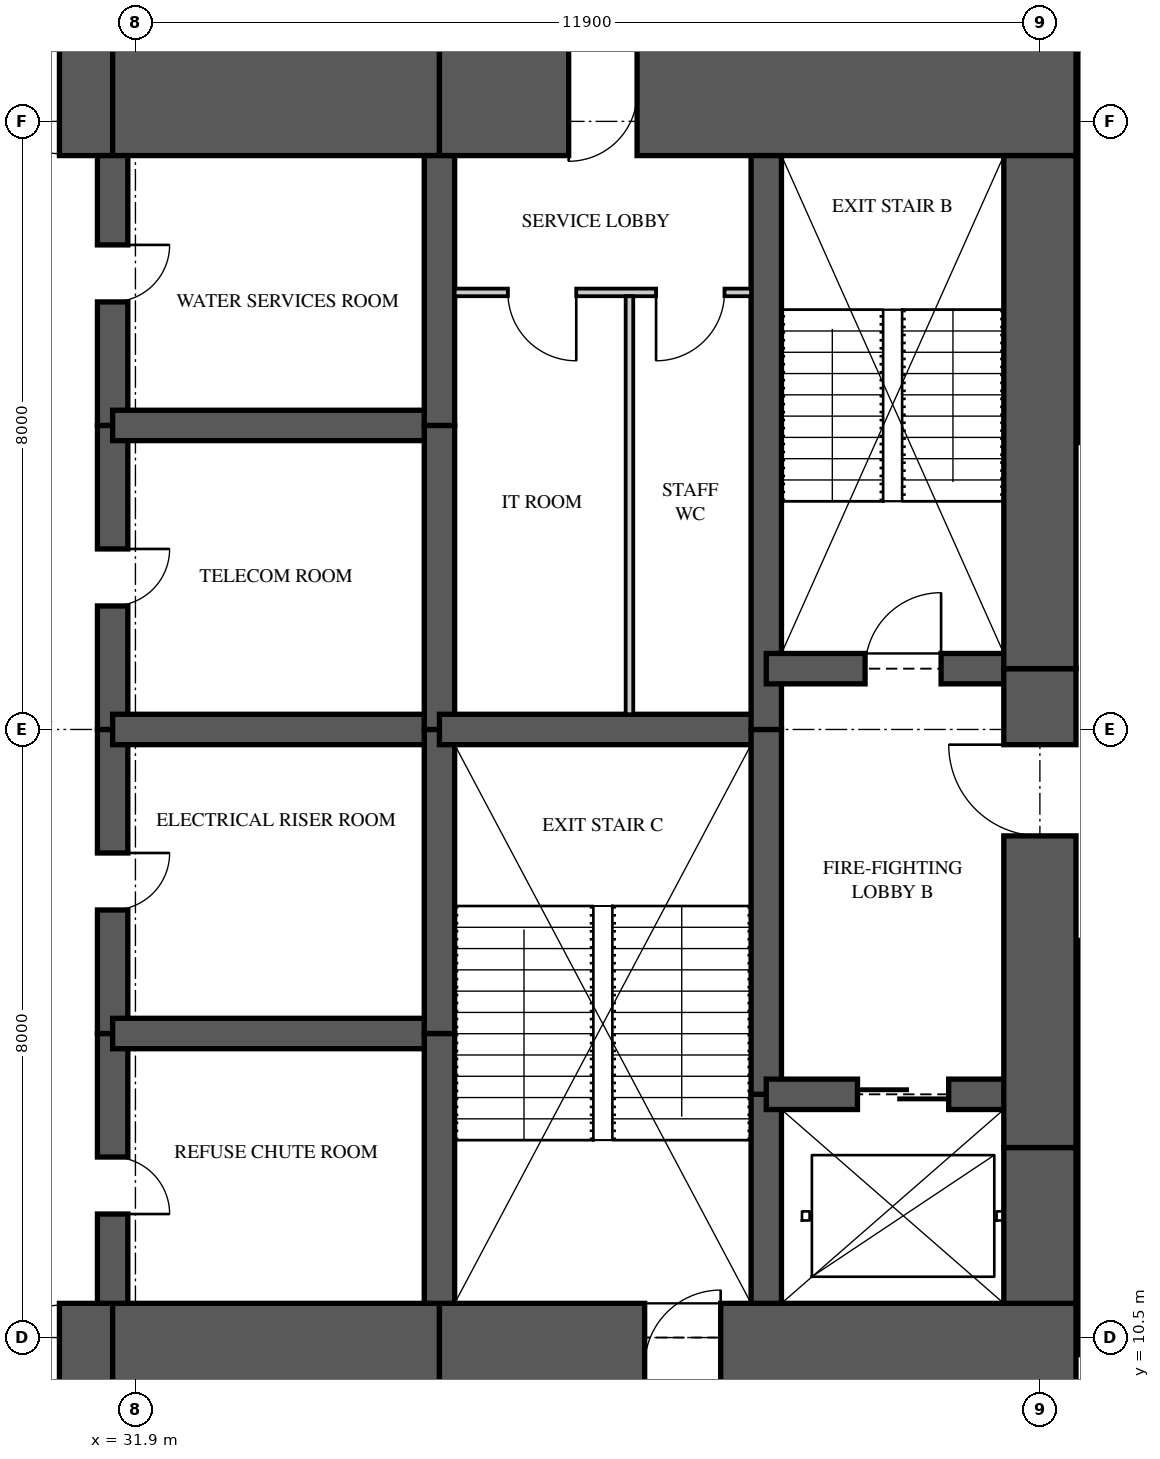
"""IFC4 building model, lengths in metres.
Left out: names, types, materials, properties, quantities, classifications, styles, units other than length and angle.
Written with IfcOpenShell. Run it as: python <this file> out.ifc"""

import sys

from ifc_helpers import new_model, si_unit, direction, frame, frame_2d, origin, place, context, subcontext, project, spatial, rectangle, extrude, element, fill, save


model = new_model("IFC4")
c1 = context("Model", 3, precision=1e-05, world=origin(), true_north=direction((0.0, 1.0)))
c2 = subcontext(c1, "Body", "Model", "MODEL_VIEW")
j1 = project(units=[si_unit("LENGTHUNIT", "METRE"), si_unit("PLANEANGLEUNIT", "RADIAN")], contexts=[c1])
p1 = place(None, origin())
s1 = spatial("IfcSite", under=j1, at=p1, CompositionType="ELEMENT")
p2 = place(p1, origin())
s2 = spatial("IfcBuilding", under=s1, at=p2, CompositionType="ELEMENT")
p3 = place(p2, frame((0.0, 0.0, 37.75)))
s3 = spatial("IfcBuildingStorey", under=s2, at=p3, CompositionType="ELEMENT", Elevation=37.75)
p4 = place(p3, frame((26.0, 10.125, 0.0), z_axis=(0.0, 0.0, 1.0), x_axis=(1.0, 0.0, 0.0)))
e1 = element("IfcWall", 1, at=p4, inside=s3, PredefinedType="SHEAR", context=c2, shape_type="SweptSolid", body=[
    extrude(rectangle(XDim=5.6, YDim=1.65, at=frame_2d((2.8, 0.0))), origin(), (0.0, 0.0, 1.0), 3.35),
])
p5 = place(p4, frame((3.3, 0.0, 0.0)))
e2 = element("IfcOpeningElement", 2, at=p5, cuts=e1, PredefinedType="OPENING", context=c2, shape_type="SweptSolid", body=[
    extrude(rectangle(XDim=1.6, YDim=2.1, at=frame_2d((0.8, 1.05))), frame((0.0, 0.835, 0.0), z_axis=(0.0, -1.0, 0.0), x_axis=(1.0, 0.0, 0.0)), (0.0, 0.0, 1.0), 1.67),
])
p6 = place(p3, frame((31.6, 10.125, 0.0), z_axis=(0.0, 0.0, 1.0), x_axis=(1.0, 0.0, 0.0)))
e3 = element("IfcWall", 3, at=p6, inside=s3, PredefinedType="SHEAR", context=c2, shape_type="SweptSolid", body=[
    extrude(rectangle(XDim=4.3, YDim=1.65, at=frame_2d((2.15, 0.0))), origin(), (0.0, 0.0, 1.0), 3.35),
])
p7 = place(p3, frame((35.9, 10.125, 0.0), z_axis=(0.0, 0.0, 1.0), x_axis=(1.0, 0.0, 0.0)))
e4 = element("IfcWall", 4, at=p7, inside=s3, PredefinedType="SHEAR", context=c2, shape_type="SweptSolid", body=[
    extrude(rectangle(XDim=8.375, YDim=1.65, at=frame_2d((4.188, 0.0))), origin(), (0.0, 0.0, 1.0), 3.35),
])
p8 = place(p7, frame((2.7, 0.0, 0.0)))
e5 = element("IfcOpeningElement", 5, at=p8, cuts=e4, PredefinedType="OPENING", context=c2, shape_type="SweptSolid", body=[
    extrude(rectangle(XDim=1.0, YDim=2.1, at=frame_2d((0.5, 1.05))), frame((0.0, 0.835, 0.0), z_axis=(0.0, -1.0, 0.0), x_axis=(1.0, 0.0, 0.0)), (0.0, 0.0, 1.0), 1.67),
])
p9 = place(p3, frame((44.275, 26.875, 0.0), z_axis=(0.0, 0.0, 1.0), x_axis=(-1.0, 0.0, 0.0)))
e6 = element("IfcWall", 6, at=p9, inside=s3, PredefinedType="SHEAR", context=c2, shape_type="SweptSolid", body=[
    extrude(rectangle(XDim=8.375, YDim=1.65, at=frame_2d((4.188, 0.0))), origin(), (0.0, 0.0, 1.0), 3.35),
])
p10 = place(p9, frame((5.775, 0.0, 0.0)))
e7 = element("IfcOpeningElement", 7, at=p10, cuts=e6, PredefinedType="OPENING", context=c2, shape_type="SweptSolid", body=[
    extrude(rectangle(XDim=0.9, YDim=2.1, at=frame_2d((0.45, 1.05))), frame((0.0, 0.835, 0.0), z_axis=(0.0, -1.0, 0.0), x_axis=(1.0, 0.0, 0.0)), (0.0, 0.0, 1.0), 1.67),
])
p11 = place(p3, frame((35.9, 26.875, 0.0), z_axis=(0.0, 0.0, 1.0), x_axis=(-1.0, 0.0, 0.0)))
e8 = element("IfcWall", 8, at=p11, inside=s3, PredefinedType="SHEAR", context=c2, shape_type="SweptSolid", body=[
    extrude(rectangle(XDim=4.3, YDim=1.65, at=frame_2d((2.15, 0.0))), origin(), (0.0, 0.0, 1.0), 3.35),
])
p12 = place(p3, frame((31.6, 26.875, 0.0), z_axis=(0.0, 0.0, 1.0), x_axis=(-1.0, 0.0, 0.0)))
e9 = element("IfcWall", 9, at=p12, inside=s3, PredefinedType="SHEAR", context=c2, shape_type="SweptSolid", body=[
    extrude(rectangle(XDim=5.6, YDim=1.65, at=frame_2d((2.8, 0.0))), origin(), (0.0, 0.0, 1.0), 3.35),
])
p13 = place(p12, frame((0.7, 0.0, 0.0)))
e10 = element("IfcOpeningElement", 10, at=p13, cuts=e9, PredefinedType="OPENING", context=c2, shape_type="SweptSolid", body=[
    extrude(rectangle(XDim=1.6, YDim=2.1, at=frame_2d((0.8, 1.05))), frame((0.0, 0.835, 0.0), z_axis=(0.0, -1.0, 0.0), x_axis=(1.0, 0.0, 0.0)), (0.0, 0.0, 1.0), 1.67),
])
p14 = place(p3, frame((43.8, 10.95, 0.0), z_axis=(0.0, 0.0, 1.0), x_axis=(0.0, 1.0, 0.0)))
e11 = element("IfcWall", 11, at=p14, inside=s3, PredefinedType="SHEAR", context=c2, shape_type="SweptSolid", body=[
    extrude(rectangle(XDim=2.05, YDim=0.95, at=frame_2d((1.025, 0.0))), origin(), (0.0, 0.0, 1.0), 3.35),
])
p15 = place(p3, frame((43.8, 13.0, 0.0), z_axis=(0.0, 0.0, 1.0), x_axis=(0.0, 1.0, 0.0)))
e12 = element("IfcWall", 12, at=p15, inside=s3, PredefinedType="SHEAR", context=c2, shape_type="SweptSolid", body=[
    extrude(rectangle(XDim=6.3, YDim=0.95, at=frame_2d((3.15, 0.0))), origin(), (0.0, 0.0, 1.0), 3.35),
])
p16 = place(p15, frame((4.1, 0.0, 0.0)))
e13 = element("IfcOpeningElement", 13, at=p16, cuts=e12, PredefinedType="OPENING", context=c2, shape_type="SweptSolid", body=[
    extrude(rectangle(XDim=1.2, YDim=2.2, at=frame_2d((0.6, 1.1))), frame((0.0, 0.485, 0.0), z_axis=(0.0, -1.0, 0.0), x_axis=(1.0, 0.0, 0.0)), (0.0, 0.0, 1.0), 0.97),
])
p17 = place(p3, frame((43.8, 19.3, 0.0), z_axis=(0.0, 0.0, 1.0), x_axis=(0.0, 1.0, 0.0)))
e14 = element("IfcWall", 14, at=p17, inside=s3, PredefinedType="SHEAR", context=c2, shape_type="SweptSolid", body=[
    extrude(rectangle(XDim=6.75, YDim=0.95, at=frame_2d((3.375, 0.0))), origin(), (0.0, 0.0, 1.0), 3.35),
])
p18 = place(p3, frame((31.6, 10.95, 0.0), z_axis=(0.0, 0.0, 1.0), x_axis=(0.0, 1.0, 0.0)))
e15 = element("IfcWall", 15, at=p18, inside=s3, PredefinedType="SHEAR", context=c2, shape_type="SweptSolid", body=[
    extrude(rectangle(XDim=3.55, YDim=0.4, at=frame_2d((1.775, 0.0))), origin(), (0.0, 0.0, 1.0), 3.35),
])
p19 = place(p18, frame((1.175, 0.0, 0.0)))
e16 = element("IfcOpeningElement", 16, at=p19, cuts=e15, PredefinedType="OPENING", context=c2, shape_type="SweptSolid", body=[
    extrude(rectangle(XDim=0.75, YDim=2.1, at=frame_2d((0.375, 1.05))), frame((0.0, 0.21, 0.0), z_axis=(0.0, -1.0, 0.0), x_axis=(1.0, 0.0, 0.0)), (0.0, 0.0, 1.0), 0.42),
])
p20 = place(p3, frame((31.6, 14.5, 0.0), z_axis=(0.0, 0.0, 1.0), x_axis=(0.0, 1.0, 0.0)))
e17 = element("IfcWall", 17, at=p20, inside=s3, PredefinedType="SHEAR", context=c2, shape_type="SweptSolid", body=[
    extrude(rectangle(XDim=4.0, YDim=0.4, at=frame_2d((2.0, 0.0))), origin(), (0.0, 0.0, 1.0), 3.35),
])
p21 = place(p20, frame((1.625, 0.0, 0.0)))
e18 = element("IfcOpeningElement", 18, at=p21, cuts=e17, PredefinedType="OPENING", context=c2, shape_type="SweptSolid", body=[
    extrude(rectangle(XDim=0.75, YDim=2.1, at=frame_2d((0.375, 1.05))), frame((0.0, 0.21, 0.0), z_axis=(0.0, -1.0, 0.0), x_axis=(1.0, 0.0, 0.0)), (0.0, 0.0, 1.0), 0.42),
])
p22 = place(p3, frame((31.6, 18.5, 0.0), z_axis=(0.0, 0.0, 1.0), x_axis=(0.0, 1.0, 0.0)))
e19 = element("IfcWall", 19, at=p22, inside=s3, PredefinedType="SHEAR", context=c2, shape_type="SweptSolid", body=[
    extrude(rectangle(XDim=4.0, YDim=0.4, at=frame_2d((2.0, 0.0))), origin(), (0.0, 0.0, 1.0), 3.35),
])
p23 = place(p22, frame((1.625, 0.0, 0.0)))
e20 = element("IfcOpeningElement", 20, at=p23, cuts=e19, PredefinedType="OPENING", context=c2, shape_type="SweptSolid", body=[
    extrude(rectangle(XDim=0.75, YDim=2.1, at=frame_2d((0.375, 1.05))), frame((0.0, 0.21, 0.0), z_axis=(0.0, -1.0, 0.0), x_axis=(1.0, 0.0, 0.0)), (0.0, 0.0, 1.0), 0.42),
])
p24 = place(p3, frame((31.6, 22.5, 0.0), z_axis=(0.0, 0.0, 1.0), x_axis=(0.0, 1.0, 0.0)))
e21 = element("IfcWall", 21, at=p24, inside=s3, PredefinedType="SHEAR", context=c2, shape_type="SweptSolid", body=[
    extrude(rectangle(XDim=3.55, YDim=0.4, at=frame_2d((1.775, 0.0))), origin(), (0.0, 0.0, 1.0), 3.35),
])
p25 = place(p24, frame((1.625, 0.0, 0.0)))
e22 = element("IfcOpeningElement", 22, at=p25, cuts=e21, PredefinedType="OPENING", context=c2, shape_type="SweptSolid", body=[
    extrude(rectangle(XDim=0.75, YDim=2.1, at=frame_2d((0.375, 1.05))), frame((0.0, 0.21, 0.0), z_axis=(0.0, -1.0, 0.0), x_axis=(1.0, 0.0, 0.0)), (0.0, 0.0, 1.0), 0.42),
])
p26 = place(p3, frame((35.9, 10.95, 0.0), z_axis=(0.0, 0.0, 1.0), x_axis=(0.0, 1.0, 0.0)))
e23 = element("IfcWall", 23, at=p26, inside=s3, PredefinedType="SHEAR", context=c2, shape_type="SweptSolid", body=[
    extrude(rectangle(XDim=3.55, YDim=0.4, at=frame_2d((1.775, 0.0))), origin(), (0.0, 0.0, 1.0), 3.35),
])
for number, where, z_axis, x_axis in (
    (24, (35.9, 14.5, 0.0), (0.0, 0.0, 1.0), (0.0, 1.0, 0.0)),
    (25, (35.9, 18.5, 0.0), (0.0, 0.0, 1.0), (0.0, 1.0, 0.0)),
):
    element("IfcWall", number, at=place(p3, frame(where, z_axis=z_axis, x_axis=x_axis)), inside=s3, PredefinedType="SHEAR", context=c2, shape_type="SweptSolid", body=[
        extrude(rectangle(XDim=4.0, YDim=0.4, at=frame_2d((2.0, 0.0))), origin(), (0.0, 0.0, 1.0), 3.35),
    ])
p27 = place(p3, frame((35.9, 22.5, 0.0), z_axis=(0.0, 0.0, 1.0), x_axis=(0.0, 1.0, 0.0)))
e26 = element("IfcWall", 26, at=p27, inside=s3, PredefinedType="SHEAR", context=c2, shape_type="SweptSolid", body=[
    extrude(rectangle(XDim=3.55, YDim=0.4, at=frame_2d((1.775, 0.0))), origin(), (0.0, 0.0, 1.0), 3.35),
])
p28 = place(p3, frame((40.2, 10.95, 0.0), z_axis=(0.0, 0.0, 1.0), x_axis=(0.0, 1.0, 0.0)))
e27 = element("IfcWall", 27, at=p28, inside=s3, PredefinedType="SHEAR", context=c2, shape_type="SweptSolid", body=[
    extrude(rectangle(XDim=2.75, YDim=0.4, at=frame_2d((1.375, 0.0))), origin(), (0.0, 0.0, 1.0), 3.35),
])
p29 = place(p3, frame((40.2, 13.7, 0.0), z_axis=(0.0, 0.0, 1.0), x_axis=(0.0, 1.0, 0.0)))
e28 = element("IfcWall", 28, at=p29, inside=s3, PredefinedType="SHEAR", context=c2, shape_type="SweptSolid", body=[
    extrude(rectangle(XDim=4.8, YDim=0.4, at=frame_2d((2.4, 0.0))), origin(), (0.0, 0.0, 1.0), 3.35),
])
p30 = place(p3, frame((40.2, 18.5, 0.0), z_axis=(0.0, 0.0, 1.0), x_axis=(0.0, 1.0, 0.0)))
e29 = element("IfcWall", 29, at=p30, inside=s3, PredefinedType="SHEAR", context=c2, shape_type="SweptSolid", body=[
    extrude(rectangle(XDim=7.55, YDim=0.4, at=frame_2d((3.775, 0.0))), origin(), (0.0, 0.0, 1.0), 3.35),
])
for number, where, z_axis, x_axis in (
    (30, (31.6, 14.5, 0.0), (0.0, 0.0, 1.0), (1.0, 0.0, 0.0)),
    (31, (31.6, 18.5, 0.0), (0.0, 0.0, 1.0), (1.0, 0.0, 0.0)),
    (32, (31.6, 22.5, 0.0), (0.0, 0.0, 1.0), (1.0, 0.0, 0.0)),
):
    element("IfcWall", number, at=place(p3, frame(where, z_axis=z_axis, x_axis=x_axis)), inside=s3, PredefinedType="SHEAR", context=c2, shape_type="SweptSolid", body=[
        extrude(rectangle(XDim=4.3, YDim=0.4, at=frame_2d((2.15, 0.0))), origin(), (0.0, 0.0, 1.0), 3.35),
    ])
p31 = place(p3, frame((35.9, 18.5, 0.0), z_axis=(0.0, 0.0, 1.0), x_axis=(1.0, 0.0, 0.0)))
e33 = element("IfcWall", 33, at=p31, inside=s3, PredefinedType="SHEAR", context=c2, shape_type="SweptSolid", body=[
    extrude(rectangle(XDim=4.3, YDim=0.4, at=frame_2d((2.15, 0.0))), origin(), (0.0, 0.0, 1.0), 3.35),
])
p32 = place(p3, frame((40.2, 13.7, 0.0), z_axis=(0.0, 0.0, 1.0), x_axis=(1.0, 0.0, 0.0)))
e34 = element("IfcWall", 34, at=p32, inside=s3, PredefinedType="SHEAR", context=c2, shape_type="SweptSolid", body=[
    extrude(rectangle(XDim=3.6, YDim=0.4, at=frame_2d((1.8, 0.0))), origin(), (0.0, 0.0, 1.0), 3.35),
])
p33 = place(p32, frame((1.2, 0.0, 0.0)))
e35 = element("IfcOpeningElement", 35, at=p33, cuts=e34, PredefinedType="OPENING", context=c2, shape_type="SweptSolid", body=[
    extrude(rectangle(XDim=1.2, YDim=2.1, at=frame_2d((0.6, 1.05))), frame((0.0, 0.21, 0.0), z_axis=(0.0, -1.0, 0.0), x_axis=(1.0, 0.0, 0.0)), (0.0, 0.0, 1.0), 0.42),
])
p34 = place(p3, frame((40.2, 19.3, 0.0), z_axis=(0.0, 0.0, 1.0), x_axis=(1.0, 0.0, 0.0)))
e36 = element("IfcWall", 36, at=p34, inside=s3, PredefinedType="SHEAR", context=c2, shape_type="SweptSolid", body=[
    extrude(rectangle(XDim=3.6, YDim=0.4, at=frame_2d((1.8, 0.0))), origin(), (0.0, 0.0, 1.0), 3.35),
])
p35 = place(p34, frame((1.3, 0.0, 0.0)))
e37 = element("IfcOpeningElement", 37, at=p35, cuts=e36, PredefinedType="OPENING", context=c2, shape_type="SweptSolid", body=[
    extrude(rectangle(XDim=1.0, YDim=2.1, at=frame_2d((0.5, 1.05))), frame((0.0, 0.21, 0.0), z_axis=(0.0, -1.0, 0.0), x_axis=(1.0, 0.0, 0.0)), (0.0, 0.0, 1.0), 0.42),
])
p36 = place(p3, frame((36.1, 24.25, 0.0), z_axis=(0.0, 0.0, 1.0), x_axis=(1.0, 0.0, 0.0)))
e38 = element("IfcWall", 38, at=p36, inside=s3, PredefinedType="PARTITIONING", context=c2, shape_type="SweptSolid", body=[
    extrude(rectangle(XDim=3.9, YDim=0.1, at=frame_2d((1.95, 0.0))), origin(), (0.0, 0.0, 1.0), 3.11),
])
p37 = place(p36, frame((0.7, 0.0, 0.0)))
e39 = element("IfcOpeningElement", 39, at=p37, cuts=e38, PredefinedType="OPENING", context=c2, shape_type="SweptSolid", body=[
    extrude(rectangle(XDim=0.9, YDim=2.1, at=frame_2d((0.45, 1.05))), frame((0.0, 0.06, 0.0), z_axis=(0.0, -1.0, 0.0), x_axis=(1.0, 0.0, 0.0)), (0.0, 0.0, 1.0), 0.12),
])
p38 = place(p36, frame((2.65, 0.0, 0.0)))
e40 = element("IfcOpeningElement", 40, at=p38, cuts=e38, PredefinedType="OPENING", context=c2, shape_type="SweptSolid", body=[
    extrude(rectangle(XDim=0.9, YDim=2.1, at=frame_2d((0.45, 1.05))), frame((0.0, 0.06, 0.0), z_axis=(0.0, -1.0, 0.0), x_axis=(1.0, 0.0, 0.0)), (0.0, 0.0, 1.0), 0.12),
])
p39 = place(p3, frame((38.4, 18.7, 0.0), z_axis=(0.0, 0.0, 1.0), x_axis=(0.0, 1.0, 0.0)))
e41 = element("IfcWall", 41, at=p39, inside=s3, PredefinedType="PARTITIONING", context=c2, shape_type="SweptSolid", body=[
    extrude(rectangle(XDim=5.5, YDim=0.1, at=frame_2d((2.75, 0.0))), origin(), (0.0, 0.0, 1.0), 3.11),
])
p40 = place(p37, frame((0.9, 0.0, 0.0), z_axis=(0.0, 0.0, 1.0), x_axis=(-1.0, 0.0, 0.0)))
e42 = element("IfcDoor", 42, at=p40, inside=s3, OperationType="SINGLE_SWING_LEFT", PredefinedType="DOOR", context=c2, shape_type="SweptSolid", body=[
    extrude(rectangle(XDim=0.9, YDim=2.1, at=frame_2d((0.45, 1.05))), frame((0.0, 0.025, 0.0), z_axis=(0.0, -1.0, 0.0), x_axis=(1.0, 0.0, 0.0)), (0.0, 0.0, 1.0), 0.05),
])
fill(e39, e42)
p41 = place(p38, frame((0.9, 0.0, 0.0), z_axis=(0.0, 0.0, 1.0), x_axis=(-1.0, 0.0, 0.0)))
e43 = element("IfcDoor", 43, at=p41, inside=s3, OperationType="SINGLE_SWING_RIGHT", PredefinedType="DOOR", context=c2, shape_type="SweptSolid", body=[
    extrude(rectangle(XDim=0.9, YDim=2.1, at=frame_2d((0.45, 1.05))), frame((0.0, 0.025, 0.0), z_axis=(0.0, -1.0, 0.0), x_axis=(1.0, 0.0, 0.0)), (0.0, 0.0, 1.0), 0.05),
])
fill(e40, e43)
p42 = place(p35, origin())
e44 = element("IfcDoor", 44, at=p42, inside=s3, OperationType="SINGLE_SWING_RIGHT", PredefinedType="DOOR", context=c2, shape_type="SweptSolid", body=[
    extrude(rectangle(XDim=1.0, YDim=2.1, at=frame_2d((0.5, 1.05))), frame((0.0, 0.025, 0.0), z_axis=(0.0, -1.0, 0.0), x_axis=(1.0, 0.0, 0.0)), (0.0, 0.0, 1.0), 0.05),
])
fill(e37, e44)
p43 = place(p16, origin())
e45 = element("IfcDoor", 45, at=p43, inside=s3, OperationType="SINGLE_SWING_RIGHT", PredefinedType="DOOR", context=c2, shape_type="SweptSolid", body=[
    extrude(rectangle(XDim=1.2, YDim=2.2, at=frame_2d((0.6, 1.1))), frame((0.0, 0.025, 0.0), z_axis=(0.0, -1.0, 0.0), x_axis=(1.0, 0.0, 0.0)), (0.0, 0.0, 1.0), 0.05),
])
fill(e13, e45)
p44 = place(p33, origin())
e46 = element("IfcDoor", 46, at=p44, inside=s3, OperationType="SLIDING_TO_LEFT", PredefinedType="DOOR", context=c2, shape_type="SweptSolid", body=[
    extrude(rectangle(XDim=1.2, YDim=2.1, at=frame_2d((0.6, 1.05))), frame((0.0, 0.025, 0.0), z_axis=(0.0, -1.0, 0.0), x_axis=(1.0, 0.0, 0.0)), (0.0, 0.0, 1.0), 0.05),
])
fill(e35, e46)
p45 = place(p5, origin())
e47 = element("IfcDoor", 47, at=p45, inside=s3, OperationType="DOUBLE_DOOR_SINGLE_SWING", PredefinedType="DOOR", context=c2, shape_type="SweptSolid", body=[
    extrude(rectangle(XDim=1.6, YDim=2.1, at=frame_2d((0.8, 1.05))), frame((0.0, 0.025, 0.0), z_axis=(0.0, -1.0, 0.0), x_axis=(1.0, 0.0, 0.0)), (0.0, 0.0, 1.0), 0.05),
])
fill(e2, e47)
p46 = place(p13, origin())
e48 = element("IfcDoor", 48, at=p46, inside=s3, OperationType="DOUBLE_DOOR_SINGLE_SWING", PredefinedType="DOOR", context=c2, shape_type="SweptSolid", body=[
    extrude(rectangle(XDim=1.6, YDim=2.1, at=frame_2d((0.8, 1.05))), frame((0.0, 0.025, 0.0), z_axis=(0.0, -1.0, 0.0), x_axis=(1.0, 0.0, 0.0)), (0.0, 0.0, 1.0), 0.05),
])
fill(e10, e48)
p47 = place(p19, frame((0.75, 0.0, 0.0), z_axis=(0.0, 0.0, 1.0), x_axis=(-1.0, 0.0, 0.0)))
e49 = element("IfcDoor", 49, at=p47, inside=s3, OperationType="SINGLE_SWING_RIGHT", PredefinedType="DOOR", context=c2, shape_type="SweptSolid", body=[
    extrude(rectangle(XDim=0.75, YDim=2.1, at=frame_2d((0.375, 1.05))), frame((0.0, 0.025, 0.0), z_axis=(0.0, -1.0, 0.0), x_axis=(1.0, 0.0, 0.0)), (0.0, 0.0, 1.0), 0.05),
])
fill(e16, e49)
p48 = place(p21, frame((0.75, 0.0, 0.0), z_axis=(0.0, 0.0, 1.0), x_axis=(-1.0, 0.0, 0.0)))
e50 = element("IfcDoor", 50, at=p48, inside=s3, OperationType="SINGLE_SWING_LEFT", PredefinedType="DOOR", context=c2, shape_type="SweptSolid", body=[
    extrude(rectangle(XDim=0.75, YDim=2.1, at=frame_2d((0.375, 1.05))), frame((0.0, 0.025, 0.0), z_axis=(0.0, -1.0, 0.0), x_axis=(1.0, 0.0, 0.0)), (0.0, 0.0, 1.0), 0.05),
])
fill(e18, e50)
p49 = place(p23, frame((0.75, 0.0, 0.0), z_axis=(0.0, 0.0, 1.0), x_axis=(-1.0, 0.0, 0.0)))
e51 = element("IfcDoor", 51, at=p49, inside=s3, OperationType="SINGLE_SWING_LEFT", PredefinedType="DOOR", context=c2, shape_type="SweptSolid", body=[
    extrude(rectangle(XDim=0.75, YDim=2.1, at=frame_2d((0.375, 1.05))), frame((0.0, 0.025, 0.0), z_axis=(0.0, -1.0, 0.0), x_axis=(1.0, 0.0, 0.0)), (0.0, 0.0, 1.0), 0.05),
])
fill(e20, e51)
p50 = place(p25, frame((0.75, 0.0, 0.0), z_axis=(0.0, 0.0, 1.0), x_axis=(-1.0, 0.0, 0.0)))
e52 = element("IfcDoor", 52, at=p50, inside=s3, OperationType="SINGLE_SWING_LEFT", PredefinedType="DOOR", context=c2, shape_type="SweptSolid", body=[
    extrude(rectangle(XDim=0.75, YDim=2.1, at=frame_2d((0.375, 1.05))), frame((0.0, 0.025, 0.0), z_axis=(0.0, -1.0, 0.0), x_axis=(1.0, 0.0, 0.0)), (0.0, 0.0, 1.0), 0.05),
])
fill(e22, e52)
p51 = place(p8, origin())
e53 = element("IfcDoor", 53, at=p51, inside=s3, OperationType="SINGLE_SWING_RIGHT", PredefinedType="DOOR", context=c2, shape_type="SweptSolid", body=[
    extrude(rectangle(XDim=1.0, YDim=2.1, at=frame_2d((0.5, 1.05))), frame((0.0, 0.025, 0.0), z_axis=(0.0, -1.0, 0.0), x_axis=(1.0, 0.0, 0.0)), (0.0, 0.0, 1.0), 0.05),
])
fill(e5, e53)
p52 = place(p10, origin())
e54 = element("IfcDoor", 54, at=p52, inside=s3, OperationType="SINGLE_SWING_RIGHT", PredefinedType="DOOR", context=c2, shape_type="SweptSolid", body=[
    extrude(rectangle(XDim=0.9, YDim=2.1, at=frame_2d((0.45, 1.05))), frame((0.0, 0.47, 0.0), z_axis=(0.0, -1.0, 0.0), x_axis=(1.0, 0.0, 0.0)), (0.0, 0.0, 1.0), 0.8),
])
fill(e7, e54)
save(model, sys.argv[1])
